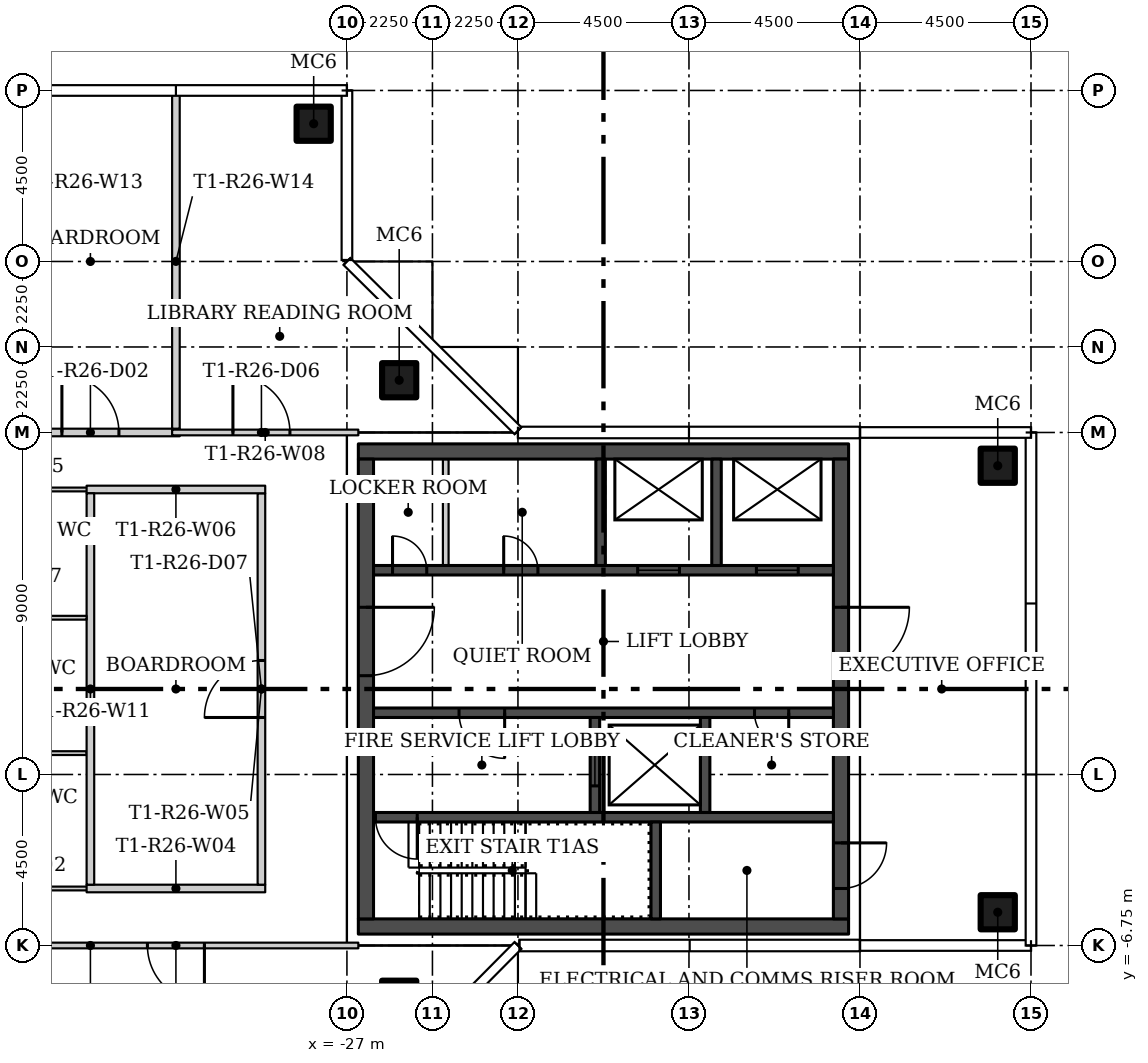
"""IFC4 building model, lengths in metres.
Left out: names, types, materials, properties, quantities, classifications, styles, units other than length and angle.
Written with IfcOpenShell. Run it as: python <this file> out.ifc"""

import sys

from ifc_helpers import new_model, si_unit, direction, frame, frame_2d, origin, origin_2d, place, context, subcontext, project, spatial, rectangle, hollow_rectangle, extrude, element, fill, save


model = new_model("IFC4")
c1 = context("Model", 3, precision=1e-05, world=origin(), true_north=direction((0.0, 1.0)))
c2 = subcontext(c1, "Body", "Model", "MODEL_VIEW")
j1 = project(units=[si_unit("LENGTHUNIT", "METRE"), si_unit("PLANEANGLEUNIT", "RADIAN")], contexts=[c1])
p1 = place(None, origin())
s1 = spatial("IfcSite", under=j1, at=p1, CompositionType="ELEMENT")
p2 = place(p1, origin())
s2 = spatial("IfcBuilding", under=s1, at=p2, CompositionType="ELEMENT")
p3 = place(p2, frame((0.0, 0.0, 242.1)))
s3 = spatial("IfcBuildingStorey", under=s2, at=p3, CompositionType="ELEMENT", Elevation=242.1)
for number, where in (
    (1, (-25.625, 8.125, 0.0)),
    (2, (-25.625, -8.125, 0.0)),
    (3, (-9.875, -5.875, 0.0)),
    (4, (-9.875, 5.875, 0.0)),
    (5, (-27.875, 14.875, 0.0)),
):
    element("IfcColumn", number, at=place(p3, frame(where)), inside=s3, PredefinedType="COLUMN", context=c2, shape_type="SweptSolid", body=[
        extrude(hollow_rectangle(XDim=0.9, YDim=0.9, WallThickness=0.036, at=origin_2d()), origin(), (0.0, 0.0, 1.0), 3.55),
    ])
p4 = place(p3, frame((-38.3, -5.25, 0.0)))
e6 = element("IfcWall", 6, at=p4, inside=s3, PredefinedType="PARTITIONING", context=c2, shape_type="SweptSolid", body=[
    extrude(rectangle(XDim=4.65, YDim=0.1, at=frame_2d((2.325, 0.0))), origin(), (0.0, 0.0, 1.0), 3.55),
])
p5 = place(p4, frame((1.85, 0.0, 0.0)))
e7 = element("IfcOpeningElement", 7, at=p5, cuts=e6, PredefinedType="OPENING", context=c2, shape_type="SweptSolid", body=[
    extrude(rectangle(XDim=0.9, YDim=2.1, at=frame_2d((0.45, 1.05))), frame((0.0, 0.06, 0.0), z_axis=(0.0, -1.0, 0.0), x_axis=(1.0, 0.0, 0.0)), (0.0, 0.0, 1.0), 0.12),
])
p6 = place(p3, frame((-33.65, 5.25, 0.0), z_axis=(0.0, 0.0, 1.0), x_axis=(-1.0, 0.0, 0.0)))
e8 = element("IfcWall", 8, at=p6, inside=s3, PredefinedType="PARTITIONING", context=c2, shape_type="SweptSolid", body=[
    extrude(rectangle(XDim=4.65, YDim=0.1, at=frame_2d((2.325, 0.0))), origin(), (0.0, 0.0, 1.0), 3.55),
])
p7 = place(p6, frame((1.9, 0.0, 0.0)))
e9 = element("IfcOpeningElement", 9, at=p7, cuts=e8, PredefinedType="OPENING", context=c2, shape_type="SweptSolid", body=[
    extrude(rectangle(XDim=0.9, YDim=2.1, at=frame_2d((0.45, 1.05))), frame((0.0, 0.06, 0.0), z_axis=(0.0, -1.0, 0.0), x_axis=(1.0, 0.0, 0.0)), (0.0, 0.0, 1.0), 0.12),
])
p8 = place(p3, frame((-33.85, -5.25, 0.0)))
e10 = element("IfcWall", 10, at=p8, inside=s3, PredefinedType="PARTITIONING", context=c2, shape_type="SweptSolid", body=[
    extrude(rectangle(XDim=4.7, YDim=0.2, at=frame_2d((2.35, 0.0))), origin(), (0.0, 0.0, 1.0), 3.55),
])
p9 = place(p3, frame((-29.25, -5.15, 0.0), z_axis=(0.0, 0.0, 1.0), x_axis=(0.0, 1.0, 0.0)))
e11 = element("IfcWall", 11, at=p9, inside=s3, PredefinedType="PARTITIONING", context=c2, shape_type="SweptSolid", body=[
    extrude(rectangle(XDim=10.3, YDim=0.2, at=frame_2d((5.15, 0.0))), origin(), (0.0, 0.0, 1.0), 3.55),
])
p10 = place(p9, frame((4.4, 0.0, 0.0)))
e12 = element("IfcOpeningElement", 12, at=p10, cuts=e11, PredefinedType="OPENING", context=c2, shape_type="SweptSolid", body=[
    extrude(rectangle(XDim=1.5, YDim=2.4, at=frame_2d((0.75, 1.2))), frame((0.0, 0.11, 0.0), z_axis=(0.0, -1.0, 0.0), x_axis=(1.0, 0.0, 0.0)), (0.0, 0.0, 1.0), 0.22),
])
p11 = place(p3, frame((-29.15, 5.25, 0.0), z_axis=(0.0, 0.0, 1.0), x_axis=(-1.0, 0.0, 0.0)))
e13 = element("IfcWall", 13, at=p11, inside=s3, PredefinedType="PARTITIONING", context=c2, shape_type="SweptSolid", body=[
    extrude(rectangle(XDim=4.7, YDim=0.2, at=frame_2d((2.35, 0.0))), origin(), (0.0, 0.0, 1.0), 3.55),
])
p12 = place(p3, frame((-40.8, 6.75, 0.0)))
e14 = element("IfcWall", 14, at=p12, inside=s3, PredefinedType="PARTITIONING", context=c2, shape_type="SweptSolid", body=[
    extrude(rectangle(XDim=9.4, YDim=0.2, at=frame_2d((4.7, 0.0))), origin(), (0.0, 0.0, 1.0), 3.55),
])
p13 = place(p12, frame((1.8, 0.0, 0.0)))
e15 = element("IfcOpeningElement", 15, at=p13, cuts=e14, PredefinedType="OPENING", context=c2, shape_type="SweptSolid", body=[
    extrude(rectangle(XDim=1.5, YDim=2.4, at=frame_2d((0.75, 1.2))), frame((0.0, 0.11, 0.0), z_axis=(0.0, -1.0, 0.0), x_axis=(1.0, 0.0, 0.0)), (0.0, 0.0, 1.0), 0.22),
])
p14 = place(p12, frame((6.3, 0.0, 0.0)))
e16 = element("IfcOpeningElement", 16, at=p14, cuts=e14, PredefinedType="OPENING", context=c2, shape_type="SweptSolid", body=[
    extrude(rectangle(XDim=1.5, YDim=2.4, at=frame_2d((0.75, 1.2))), frame((0.0, 0.11, 0.0), z_axis=(0.0, -1.0, 0.0), x_axis=(1.0, 0.0, 0.0)), (0.0, 0.0, 1.0), 0.22),
])
p15 = place(p3, frame((-31.6, 6.75, 0.0)))
e17 = element("IfcWall", 17, at=p15, inside=s3, PredefinedType="PARTITIONING", context=c2, shape_type="SweptSolid", body=[
    extrude(rectangle(XDim=4.9, YDim=0.15, at=frame_2d((2.45, 0.0))), origin(), (0.0, 0.0, 1.0), 3.55),
])
p16 = place(p15, frame((1.6, 0.0, 0.0)))
e18 = element("IfcOpeningElement", 18, at=p16, cuts=e17, PredefinedType="OPENING", context=c2, shape_type="SweptSolid", body=[
    extrude(rectangle(XDim=1.5, YDim=2.1, at=frame_2d((0.75, 1.05))), frame((0.0, 0.085, 0.0), z_axis=(0.0, -1.0, 0.0), x_axis=(1.0, 0.0, 0.0)), (0.0, 0.0, 1.0), 0.17),
])
p17 = place(p3, frame((-26.7, -6.75, 0.0), z_axis=(0.0, 0.0, 1.0), x_axis=(-1.0, 0.0, 0.0)))
e19 = element("IfcWall", 19, at=p17, inside=s3, PredefinedType="PARTITIONING", context=c2, shape_type="SweptSolid", body=[
    extrude(rectangle(XDim=14.1, YDim=0.15, at=frame_2d((7.05, 0.0))), origin(), (0.0, 0.0, 1.0), 3.55),
])
p18 = place(p17, frame((4.05, 0.0, 0.0)))
e20 = element("IfcOpeningElement", 20, at=p18, cuts=e19, PredefinedType="OPENING", context=c2, shape_type="SweptSolid", body=[
    extrude(rectangle(XDim=1.5, YDim=2.1, at=frame_2d((0.75, 1.05))), frame((0.0, 0.085, 0.0), z_axis=(0.0, -1.0, 0.0), x_axis=(1.0, 0.0, 0.0)), (0.0, 0.0, 1.0), 0.17),
])
p19 = place(p17, frame((11.05, 0.0, 0.0)))
e21 = element("IfcOpeningElement", 21, at=p19, cuts=e19, PredefinedType="OPENING", context=c2, shape_type="SweptSolid", body=[
    extrude(rectangle(XDim=1.0, YDim=2.4, at=frame_2d((0.5, 1.2))), frame((0.0, 0.085, 0.0), z_axis=(0.0, -1.0, 0.0), x_axis=(1.0, 0.0, 0.0)), (0.0, 0.0, 1.0), 0.17),
])
p20 = place(p3, frame((-33.85, -1.688, 0.0), z_axis=(0.0, 0.0, 1.0), x_axis=(-1.0, 0.0, 0.0)))
e22 = element("IfcWall", 22, at=p20, inside=s3, PredefinedType="PARTITIONING", context=c2, shape_type="SweptSolid", body=[
    extrude(rectangle(XDim=4.35, YDim=0.1, at=frame_2d((2.175, 0.0))), origin(), (0.0, 0.0, 1.0), 3.55),
])
p21 = place(p3, frame((-33.75, -5.15, 0.0), z_axis=(0.0, 0.0, 1.0), x_axis=(0.0, 1.0, 0.0)))
e23 = element("IfcWall", 23, at=p21, inside=s3, PredefinedType="PARTITIONING", context=c2, shape_type="SweptSolid", body=[
    extrude(rectangle(XDim=10.3, YDim=0.2, at=frame_2d((5.15, 0.0))), origin(), (0.0, 0.0, 1.0), 3.55),
])
p22 = place(p3, frame((-33.85, 1.875, 0.0), z_axis=(0.0, 0.0, 1.0), x_axis=(-1.0, 0.0, 0.0)))
e24 = element("IfcWall", 24, at=p22, inside=s3, PredefinedType="PARTITIONING", context=c2, shape_type="SweptSolid", body=[
    extrude(rectangle(XDim=4.35, YDim=0.1, at=frame_2d((2.175, 0.0))), origin(), (0.0, 0.0, 1.0), 3.55),
])
p23 = place(p3, frame((-31.5, 6.85, 0.0), z_axis=(0.0, 0.0, 1.0), x_axis=(0.0, 1.0, 0.0)))
e25 = element("IfcWall", 25, at=p23, inside=s3, PredefinedType="PARTITIONING", context=c2, shape_type="SweptSolid", body=[
    extrude(rectangle(XDim=8.805, YDim=0.2, at=frame_2d((4.402, 0.0))), origin(), (0.0, 0.0, 1.0), 3.55),
])
for number, where in (
    (26, (-26.7, -6.25, 0.0)),
    (27, (-26.7, 6.25, 0.0)),
):
    element("IfcWall", number, at=place(p3, frame(where)), inside=s3, PredefinedType="SHEAR", context=c2, shape_type="SweptSolid", body=[
        extrude(rectangle(XDim=12.9, YDim=0.4, at=frame_2d((6.45, 0.0))), origin(), (0.0, 0.0, 1.0), 3.55),
    ])
p24 = place(p3, frame((-26.5, 6.05, 0.0), z_axis=(0.0, 0.0, 1.0), x_axis=(0.0, -1.0, 0.0)))
e28 = element("IfcWall", 28, at=p24, inside=s3, PredefinedType="SHEAR", context=c2, shape_type="SweptSolid", body=[
    extrude(rectangle(XDim=12.1, YDim=0.4, at=frame_2d((6.05, 0.0))), origin(), (0.0, 0.0, 1.0), 3.55),
])
p25 = place(p24, frame((3.9, 0.0, 0.0)))
e29 = element("IfcOpeningElement", 29, at=p25, cuts=e28, PredefinedType="OPENING", context=c2, shape_type="SweptSolid", body=[
    extrude(rectangle(XDim=1.8, YDim=2.4, at=frame_2d((0.9, 1.2))), frame((0.0, 0.21, 0.0), z_axis=(0.0, -1.0, 0.0), x_axis=(1.0, 0.0, 0.0)), (0.0, 0.0, 1.0), 0.42),
])
p26 = place(p3, frame((-14.0, 6.05, 0.0), z_axis=(0.0, 0.0, 1.0), x_axis=(0.0, -1.0, 0.0)))
e30 = element("IfcWall", 30, at=p26, inside=s3, PredefinedType="SHEAR", context=c2, shape_type="SweptSolid", body=[
    extrude(rectangle(XDim=12.1, YDim=0.4, at=frame_2d((6.05, 0.0))), origin(), (0.0, 0.0, 1.0), 3.55),
])
p27 = place(p26, frame((10.1, 0.0, 0.0)))
e31 = element("IfcOpeningElement", 31, at=p27, cuts=e30, PredefinedType="OPENING", context=c2, shape_type="SweptSolid", body=[
    extrude(rectangle(XDim=1.2, YDim=2.1, at=frame_2d((0.6, 1.05))), frame((0.0, 0.21, 0.0), z_axis=(0.0, -1.0, 0.0), x_axis=(1.0, 0.0, 0.0)), (0.0, 0.0, 1.0), 0.42),
])
p28 = place(p26, frame((3.9, 0.0, 0.0)))
e32 = element("IfcOpeningElement", 32, at=p28, cuts=e30, PredefinedType="OPENING", context=c2, shape_type="SweptSolid", body=[
    extrude(rectangle(XDim=1.8, YDim=2.4, at=frame_2d((0.9, 1.2))), frame((0.0, 0.21, 0.0), z_axis=(0.0, -1.0, 0.0), x_axis=(1.0, 0.0, 0.0)), (0.0, 0.0, 1.0), 0.42),
])
p29 = place(p3, frame((-14.2, -3.375, 0.0), z_axis=(0.0, 0.0, 1.0), x_axis=(-1.0, 0.0, 0.0)))
e33 = element("IfcWall", 33, at=p29, inside=s3, PredefinedType="SHEAR", context=c2, shape_type="SweptSolid", body=[
    extrude(rectangle(XDim=12.1, YDim=0.25, at=frame_2d((6.05, 0.0))), origin(), (0.0, 0.0, 1.0), 3.55),
])
p30 = place(p29, frame((10.95, 0.0, 0.0)))
e34 = element("IfcOpeningElement", 34, at=p30, cuts=e33, PredefinedType="OPENING", context=c2, shape_type="SweptSolid", body=[
    extrude(rectangle(XDim=1.1, YDim=2.1, at=frame_2d((0.55, 1.05))), frame((0.0, 0.135, 0.0), z_axis=(0.0, -1.0, 0.0), x_axis=(1.0, 0.0, 0.0)), (0.0, 0.0, 1.0), 0.27),
])
p31 = place(p3, frame((-18.875, -6.05, 0.0), z_axis=(0.0, 0.0, 1.0), x_axis=(0.0, 1.0, 0.0)))
e35 = element("IfcWall", 35, at=p31, inside=s3, PredefinedType="SHEAR", context=c2, shape_type="SweptSolid", body=[
    extrude(rectangle(XDim=2.55, YDim=0.25, at=frame_2d((1.275, 0.0))), origin(), (0.0, 0.0, 1.0), 3.55),
])
p32 = place(p3, frame((-14.2, -0.625, 0.0), z_axis=(0.0, 0.0, 1.0), x_axis=(-1.0, 0.0, 0.0)))
e36 = element("IfcWall", 36, at=p32, inside=s3, PredefinedType="SHEAR", context=c2, shape_type="SweptSolid", body=[
    extrude(rectangle(XDim=12.1, YDim=0.25, at=frame_2d((6.05, 0.0))), origin(), (0.0, 0.0, 1.0), 3.55),
])
p33 = place(p32, frame((8.65, 0.0, 0.0)))
e37 = element("IfcOpeningElement", 37, at=p33, cuts=e36, PredefinedType="OPENING", context=c2, shape_type="SweptSolid", body=[
    extrude(rectangle(XDim=1.2, YDim=2.1, at=frame_2d((0.6, 1.05))), frame((0.0, 0.135, 0.0), z_axis=(0.0, -1.0, 0.0), x_axis=(1.0, 0.0, 0.0)), (0.0, 0.0, 1.0), 0.27),
])
p34 = place(p32, frame((1.175, 0.0, 0.0)))
e38 = element("IfcOpeningElement", 38, at=p34, cuts=e36, PredefinedType="OPENING", context=c2, shape_type="SweptSolid", body=[
    extrude(rectangle(XDim=0.9, YDim=2.1, at=frame_2d((0.45, 1.05))), frame((0.0, 0.135, 0.0), z_axis=(0.0, -1.0, 0.0), x_axis=(1.0, 0.0, 0.0)), (0.0, 0.0, 1.0), 0.27),
])
p35 = place(p3, frame((-20.475, -3.25, 0.0), z_axis=(0.0, 0.0, 1.0), x_axis=(0.0, 1.0, 0.0)))
e39 = element("IfcWall", 39, at=p35, inside=s3, PredefinedType="SHEAR", context=c2, shape_type="SweptSolid", body=[
    extrude(rectangle(XDim=2.5, YDim=0.25, at=frame_2d((1.25, 0.0))), origin(), (0.0, 0.0, 1.0), 3.55),
])
p36 = place(p35, frame((0.7, 0.0, 0.0)))
e40 = element("IfcOpeningElement", 40, at=p36, cuts=e39, PredefinedType="OPENING", context=c2, shape_type="SweptSolid", body=[
    extrude(rectangle(XDim=1.1, YDim=2.1, at=frame_2d((0.55, 1.05))), frame((0.0, 0.135, 0.0), z_axis=(0.0, -1.0, 0.0), x_axis=(1.0, 0.0, 0.0)), (0.0, 0.0, 1.0), 0.27),
])
p37 = place(p3, frame((-17.575, -3.25, 0.0), z_axis=(0.0, 0.0, 1.0), x_axis=(0.0, 1.0, 0.0)))
e41 = element("IfcWall", 41, at=p37, inside=s3, PredefinedType="SHEAR", context=c2, shape_type="SweptSolid", body=[
    extrude(rectangle(XDim=2.5, YDim=0.25, at=frame_2d((1.25, 0.0))), origin(), (0.0, 0.0, 1.0), 3.55),
])
p38 = place(p3, frame((-26.3, 3.125, 0.0)))
e42 = element("IfcWall", 42, at=p38, inside=s3, PredefinedType="SHEAR", context=c2, shape_type="SweptSolid", body=[
    extrude(rectangle(XDim=12.1, YDim=0.25, at=frame_2d((6.05, 0.0))), origin(), (0.0, 0.0, 1.0), 3.55),
])
p39 = place(p38, frame((6.95, 0.0, 0.0)))
e43 = element("IfcOpeningElement", 43, at=p39, cuts=e42, PredefinedType="OPENING", context=c2, shape_type="SweptSolid", body=[
    extrude(rectangle(XDim=1.1, YDim=2.1, at=frame_2d((0.55, 1.05))), frame((0.0, 0.135, 0.0), z_axis=(0.0, -1.0, 0.0), x_axis=(1.0, 0.0, 0.0)), (0.0, 0.0, 1.0), 0.27),
])
p40 = place(p38, frame((10.075, 0.0, 0.0)))
e44 = element("IfcOpeningElement", 44, at=p40, cuts=e42, PredefinedType="OPENING", context=c2, shape_type="SweptSolid", body=[
    extrude(rectangle(XDim=1.1, YDim=2.1, at=frame_2d((0.55, 1.05))), frame((0.0, 0.135, 0.0), z_axis=(0.0, -1.0, 0.0), x_axis=(1.0, 0.0, 0.0)), (0.0, 0.0, 1.0), 0.27),
])
p41 = place(p38, frame((0.5, 0.0, 0.0)))
e45 = element("IfcOpeningElement", 45, at=p41, cuts=e42, PredefinedType="OPENING", context=c2, shape_type="SweptSolid", body=[
    extrude(rectangle(XDim=0.9, YDim=2.1, at=frame_2d((0.45, 1.05))), frame((0.0, 0.135, 0.0), z_axis=(0.0, -1.0, 0.0), x_axis=(1.0, 0.0, 0.0)), (0.0, 0.0, 1.0), 0.27),
])
p42 = place(p38, frame((3.425, 0.0, 0.0)))
e46 = element("IfcOpeningElement", 46, at=p42, cuts=e42, PredefinedType="OPENING", context=c2, shape_type="SweptSolid", body=[
    extrude(rectangle(XDim=0.9, YDim=2.1, at=frame_2d((0.45, 1.05))), frame((0.0, 0.135, 0.0), z_axis=(0.0, -1.0, 0.0), x_axis=(1.0, 0.0, 0.0)), (0.0, 0.0, 1.0), 0.27),
])
for number, where, z_axis, x_axis in (
    (47, (-20.325, 3.25, 0.0), (0.0, 0.0, 1.0), (0.0, 1.0, 0.0)),
    (48, (-17.275, 3.25, 0.0), (0.0, 0.0, 1.0), (0.0, 1.0, 0.0)),
):
    element("IfcWall", number, at=place(p3, frame(where, z_axis=z_axis, x_axis=x_axis)), inside=s3, PredefinedType="SHEAR", context=c2, shape_type="SweptSolid", body=[
        extrude(rectangle(XDim=2.8, YDim=0.25, at=frame_2d((1.4, 0.0))), origin(), (0.0, 0.0, 1.0), 3.55),
    ])
p43 = place(p3, frame((-24.4, 3.25, 0.0), z_axis=(0.0, 0.0, 1.0), x_axis=(0.0, 1.0, 0.0)))
e49 = element("IfcWall", 49, at=p43, inside=s3, PredefinedType="PARTITIONING", context=c2, shape_type="SweptSolid", body=[
    extrude(rectangle(XDim=2.8, YDim=0.15, at=frame_2d((1.4, 0.0))), origin(), (0.0, 0.0, 1.0), 3.55),
])
p44 = place(p14, origin())
e50 = element("IfcDoor", 50, at=p44, inside=s3, OperationType="DOUBLE_DOOR_SINGLE_SWING", PredefinedType="DOOR", context=c2, shape_type="SweptSolid", body=[
    extrude(rectangle(XDim=1.5, YDim=2.4, at=frame_2d((0.75, 1.2))), frame((0.0, 0.025, 0.0), z_axis=(0.0, -1.0, 0.0), x_axis=(1.0, 0.0, 0.0)), (0.0, 0.0, 1.0), 0.05),
])
fill(e16, e50)
p45 = place(p16, origin())
e51 = element("IfcDoor", 51, at=p45, inside=s3, OperationType="DOUBLE_DOOR_SINGLE_SWING", PredefinedType="DOOR", context=c2, shape_type="SweptSolid", body=[
    extrude(rectangle(XDim=1.5, YDim=2.1, at=frame_2d((0.75, 1.05))), frame((0.0, 0.025, 0.0), z_axis=(0.0, -1.0, 0.0), x_axis=(1.0, 0.0, 0.0)), (0.0, 0.0, 1.0), 0.05),
])
fill(e18, e51)
p46 = place(p10, origin())
e52 = element("IfcDoor", 52, at=p46, inside=s3, OperationType="DOUBLE_DOOR_SINGLE_SWING", PredefinedType="DOOR", context=c2, shape_type="SweptSolid", body=[
    extrude(rectangle(XDim=1.5, YDim=2.4, at=frame_2d((0.75, 1.2))), frame((0.0, 0.025, 0.0), z_axis=(0.0, -1.0, 0.0), x_axis=(1.0, 0.0, 0.0)), (0.0, 0.0, 1.0), 0.05),
])
fill(e12, e52)
p47 = place(p18, origin())
e53 = element("IfcDoor", 53, at=p47, inside=s3, OperationType="DOUBLE_DOOR_SINGLE_SWING", PredefinedType="DOOR", context=c2, shape_type="SweptSolid", body=[
    extrude(rectangle(XDim=1.5, YDim=2.1, at=frame_2d((0.75, 1.05))), frame((0.0, 0.025, 0.0), z_axis=(0.0, -1.0, 0.0), x_axis=(1.0, 0.0, 0.0)), (0.0, 0.0, 1.0), 0.05),
])
fill(e20, e53)
p48 = place(p25, origin())
e54 = element("IfcDoor", 54, at=p48, inside=s3, OperationType="DOUBLE_DOOR_SINGLE_SWING", PredefinedType="DOOR", context=c2, shape_type="SweptSolid", body=[
    extrude(rectangle(XDim=1.8, YDim=2.4, at=frame_2d((0.9, 1.2))), frame((0.0, 0.025, 0.0), z_axis=(0.0, -1.0, 0.0), x_axis=(1.0, 0.0, 0.0)), (0.0, 0.0, 1.0), 0.05),
])
fill(e29, e54)
p49 = place(p27, origin())
e55 = element("IfcDoor", 55, at=p49, inside=s3, OperationType="SINGLE_SWING_RIGHT", PredefinedType="DOOR", context=c2, shape_type="SweptSolid", body=[
    extrude(rectangle(XDim=1.2, YDim=2.1, at=frame_2d((0.6, 1.05))), frame((0.0, 0.025, 0.0), z_axis=(0.0, -1.0, 0.0), x_axis=(1.0, 0.0, 0.0)), (0.0, 0.0, 1.0), 0.05),
])
fill(e31, e55)
p50 = place(p28, origin())
e56 = element("IfcDoor", 56, at=p50, inside=s3, OperationType="DOUBLE_DOOR_SINGLE_SWING", PredefinedType="DOOR", context=c2, shape_type="SweptSolid", body=[
    extrude(rectangle(XDim=1.8, YDim=2.4, at=frame_2d((0.9, 1.2))), frame((0.0, 0.025, 0.0), z_axis=(0.0, -1.0, 0.0), x_axis=(1.0, 0.0, 0.0)), (0.0, 0.0, 1.0), 0.05),
])
fill(e32, e56)
p51 = place(p30, origin())
e57 = element("IfcDoor", 57, at=p51, inside=s3, OperationType="SINGLE_SWING_RIGHT", PredefinedType="DOOR", context=c2, shape_type="SweptSolid", body=[
    extrude(rectangle(XDim=1.1, YDim=2.1, at=frame_2d((0.55, 1.05))), frame((0.0, 0.025, 0.0), z_axis=(0.0, -1.0, 0.0), x_axis=(1.0, 0.0, 0.0)), (0.0, 0.0, 1.0), 0.05),
])
fill(e34, e57)
p52 = place(p33, origin())
e58 = element("IfcDoor", 58, at=p52, inside=s3, OperationType="SINGLE_SWING_RIGHT", PredefinedType="DOOR", context=c2, shape_type="SweptSolid", body=[
    extrude(rectangle(XDim=1.2, YDim=2.1, at=frame_2d((0.6, 1.05))), frame((0.0, 0.025, 0.0), z_axis=(0.0, -1.0, 0.0), x_axis=(1.0, 0.0, 0.0)), (0.0, 0.0, 1.0), 0.05),
])
fill(e37, e58)
p53 = place(p34, origin())
e59 = element("IfcDoor", 59, at=p53, inside=s3, OperationType="SINGLE_SWING_LEFT", PredefinedType="DOOR", context=c2, shape_type="SweptSolid", body=[
    extrude(rectangle(XDim=0.9, YDim=2.1, at=frame_2d((0.45, 1.05))), frame((0.0, 0.025, 0.0), z_axis=(0.0, -1.0, 0.0), x_axis=(1.0, 0.0, 0.0)), (0.0, 0.0, 1.0), 0.05),
])
fill(e38, e59)
p54 = place(p36, origin())
e60 = element("IfcDoor", 60, at=p54, inside=s3, OperationType="SLIDING_TO_LEFT", PredefinedType="DOOR", context=c2, shape_type="SweptSolid", body=[
    extrude(rectangle(XDim=1.1, YDim=2.1, at=frame_2d((0.55, 1.05))), frame((0.0, 0.025, 0.0), z_axis=(0.0, -1.0, 0.0), x_axis=(1.0, 0.0, 0.0)), (0.0, 0.0, 1.0), 0.05),
])
fill(e40, e60)
p55 = place(p39, origin())
e61 = element("IfcDoor", 61, at=p55, inside=s3, OperationType="SLIDING_TO_LEFT", PredefinedType="DOOR", context=c2, shape_type="SweptSolid", body=[
    extrude(rectangle(XDim=1.1, YDim=2.1, at=frame_2d((0.55, 1.05))), frame((0.0, 0.025, 0.0), z_axis=(0.0, -1.0, 0.0), x_axis=(1.0, 0.0, 0.0)), (0.0, 0.0, 1.0), 0.05),
])
fill(e43, e61)
p56 = place(p40, origin())
e62 = element("IfcDoor", 62, at=p56, inside=s3, OperationType="SLIDING_TO_LEFT", PredefinedType="DOOR", context=c2, shape_type="SweptSolid", body=[
    extrude(rectangle(XDim=1.1, YDim=2.1, at=frame_2d((0.55, 1.05))), frame((0.0, 0.025, 0.0), z_axis=(0.0, -1.0, 0.0), x_axis=(1.0, 0.0, 0.0)), (0.0, 0.0, 1.0), 0.05),
])
fill(e44, e62)
p57 = place(p41, origin())
e63 = element("IfcDoor", 63, at=p57, inside=s3, OperationType="SINGLE_SWING_LEFT", PredefinedType="DOOR", context=c2, shape_type="SweptSolid", body=[
    extrude(rectangle(XDim=0.9, YDim=2.1, at=frame_2d((0.45, 1.05))), frame((0.0, 0.025, 0.0), z_axis=(0.0, -1.0, 0.0), x_axis=(1.0, 0.0, 0.0)), (0.0, 0.0, 1.0), 0.05),
])
fill(e45, e63)
p58 = place(p42, origin())
e64 = element("IfcDoor", 64, at=p58, inside=s3, OperationType="SINGLE_SWING_LEFT", PredefinedType="DOOR", context=c2, shape_type="SweptSolid", body=[
    extrude(rectangle(XDim=0.9, YDim=2.1, at=frame_2d((0.45, 1.05))), frame((0.0, 0.025, 0.0), z_axis=(0.0, -1.0, 0.0), x_axis=(1.0, 0.0, 0.0)), (0.0, 0.0, 1.0), 0.05),
])
fill(e46, e64)
save(model, sys.argv[1])
